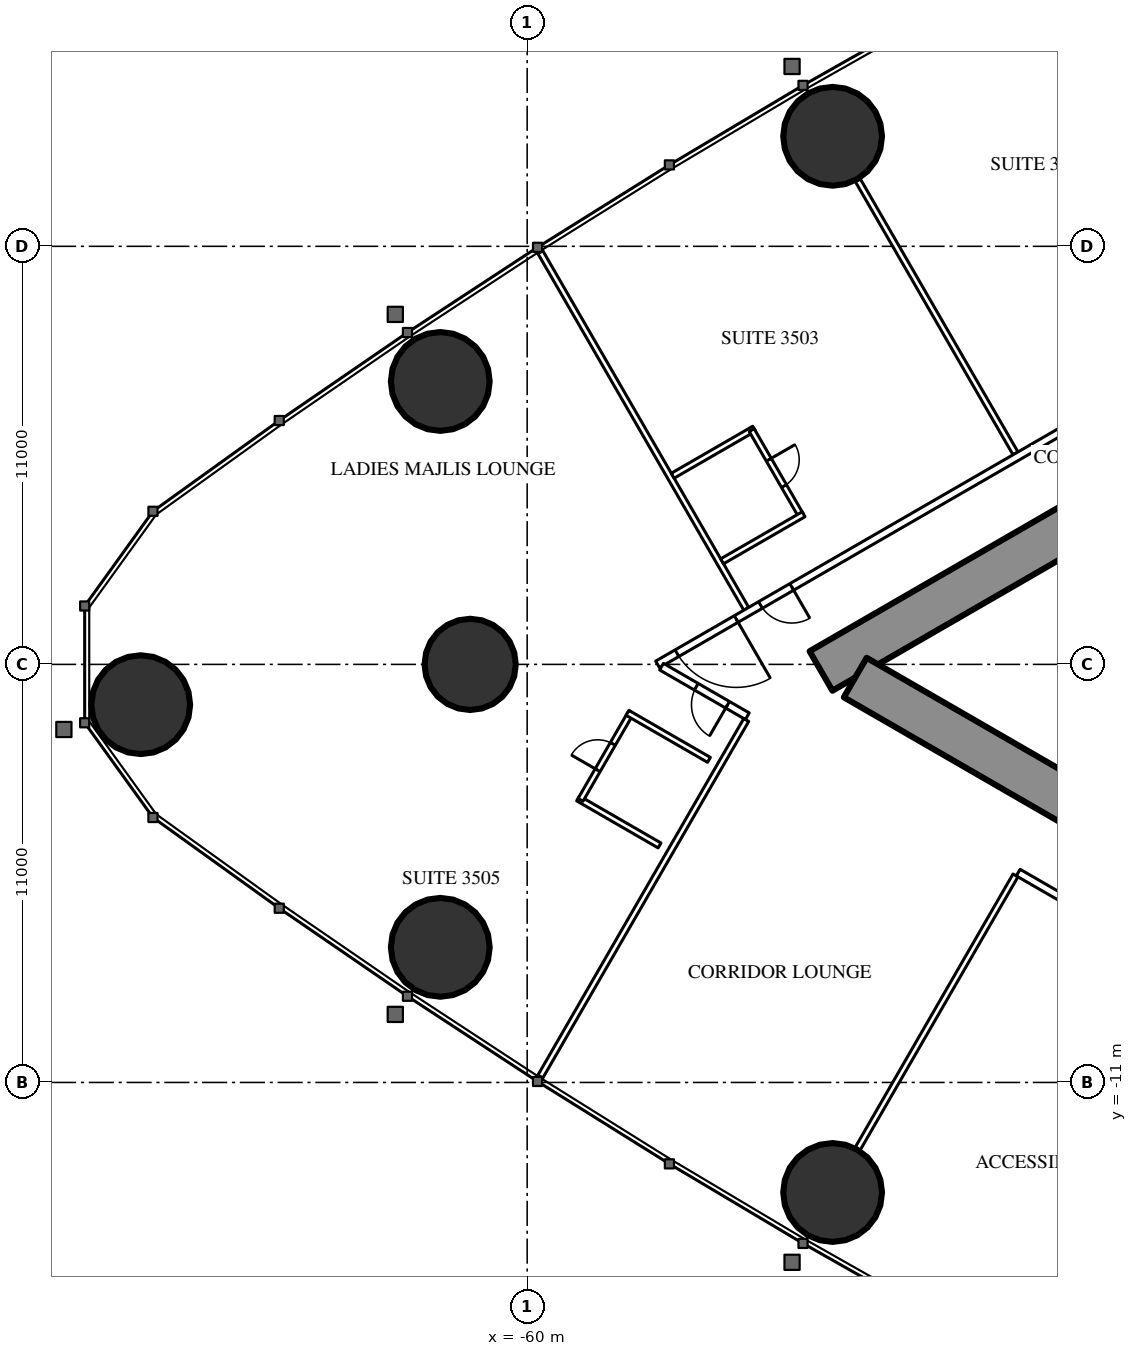
"""IFC4 building model, lengths in metres.
Left out: names, types, materials, properties, quantities, classifications, styles, units other than length and angle.
Written with IfcOpenShell. Run it as: python <this file> out.ifc"""

import sys

from ifc_helpers import new_model, si_unit, direction, frame, frame_2d, origin, origin_2d, place, context, subcontext, project, spatial, rectangle, circle, hollow_circle, extrude, element, fill, save


model = new_model("IFC4")
c1 = context("Model", 3, precision=1e-05, world=origin(), true_north=direction((0.0, 1.0)))
c2 = subcontext(c1, "Body", "Model", "MODEL_VIEW")
j1 = project(units=[si_unit("LENGTHUNIT", "METRE"), si_unit("PLANEANGLEUNIT", "RADIAN")], contexts=[c1])
p1 = place(None, origin())
s1 = spatial("IfcSite", under=j1, at=p1, CompositionType="ELEMENT")
p2 = place(p1, origin())
s2 = spatial("IfcBuilding", under=s1, at=p2, CompositionType="ELEMENT")
p3 = place(p2, frame((0.0, 0.0, 132.6)))
s3 = spatial("IfcBuildingStorey", under=s2, at=p3, CompositionType="ELEMENT", Elevation=132.6)
for number, where, z_axis, x_axis in (
    (1, (-70.168, -1.06, 0.0), (0.0, 0.0, 1.0), (1.0, 0.0, 0.0)),
    (2, (-62.287, -7.445, 0.0), (0.0, 0.0, 1.0), (1.0, 0.0, 0.0)),
    (3, (-51.963, -13.895, 0.0), (0.0, 0.0, 1.0), (1.0, 0.0, 0.0)),
    (4, (-51.963, 13.895, 0.0), (0.0, 0.0, 1.0), (1.0, 0.0, 0.0)),
    (5, (-62.287, 7.445, 0.0), (0.0, 0.0, 1.0), (1.0, 0.0, 0.0)),
):
    element("IfcColumn", number, at=place(p3, frame(where, z_axis=z_axis, x_axis=x_axis)), inside=s3, PredefinedType="COLUMN", context=c2, shape_type="SweptSolid", body=[
        extrude(hollow_circle(Radius=1.3, WallThickness=0.1, at=origin_2d()), origin(), (0.0, 0.0, 1.0), 3.5),
    ])
p4 = place(p3, frame((-61.5, 0.0, 0.0), z_axis=(0.0, 0.0, 1.0), x_axis=(1.0, 0.0, 0.0)))
e6 = element("IfcColumn", 6, at=p4, inside=s3, PredefinedType="COLUMN", context=c2, shape_type="SweptSolid", body=[
    extrude(circle(Radius=1.2, at=origin_2d()), origin(), (0.0, 0.0, 1.0), 3.5),
])
p5 = place(p3, frame((-27.2, 14.3, 0.0), z_axis=(0.0, 0.0, 1.0), x_axis=(-0.866026593062, -0.499997940104, 0.0)))
e7 = element("IfcWall", 7, at=p5, inside=s3, PredefinedType="SHEAR", context=c2, shape_type="SweptSolid", body=[
    extrude(rectangle(XDim=28.946, YDim=1.2, at=frame_2d((14.473, 0.0))), origin(), (0.0, 0.0, 1.0), 3.5),
])
p6 = place(p5, frame((4.6, 0.0, 0.0)))
e8 = element("IfcOpeningElement", 8, at=p6, cuts=e7, PredefinedType="OPENING", context=c2, shape_type="SweptSolid", body=[
    extrude(rectangle(XDim=1.0, YDim=2.2, at=frame_2d((0.5, 1.1))), frame((0.0, 0.61, 0.0), z_axis=(0.0, -1.0, 0.0), x_axis=(1.0, 0.0, 0.0)), (0.0, 0.0, 1.0), 1.22),
])
p7 = place(p5, frame((13.395, 0.0, 0.0)))
e9 = element("IfcOpeningElement", 9, at=p7, cuts=e7, PredefinedType="OPENING", context=c2, shape_type="SweptSolid", body=[
    extrude(rectangle(XDim=1.8, YDim=2.2, at=frame_2d((0.9, 1.1))), frame((0.0, 0.61, 0.0), z_axis=(0.0, -1.0, 0.0), x_axis=(1.0, 0.0, 0.0)), (0.0, 0.0, 1.0), 1.22),
])
p8 = place(p3, frame((-27.2, -14.3, 0.0), z_axis=(0.0, 0.0, 1.0), x_axis=(-0.866024021859, 0.500002393557, 0.0)))
e10 = element("IfcWall", 10, at=p8, inside=s3, PredefinedType="SHEAR", context=c2, shape_type="SweptSolid", body=[
    extrude(rectangle(XDim=27.907, YDim=1.2, at=frame_2d((13.954, 0.0))), origin(), (0.0, 0.0, 1.0), 3.5),
])
p9 = place(p8, frame((4.6, 0.0, 0.0)))
e11 = element("IfcOpeningElement", 11, at=p9, cuts=e10, PredefinedType="OPENING", context=c2, shape_type="SweptSolid", body=[
    extrude(rectangle(XDim=1.0, YDim=2.2, at=frame_2d((0.5, 1.1))), frame((0.0, 0.61, 0.0), z_axis=(0.0, -1.0, 0.0), x_axis=(1.0, 0.0, 0.0)), (0.0, 0.0, 1.0), 1.22),
])
p10 = place(p8, frame((13.395, 0.0, 0.0)))
e12 = element("IfcOpeningElement", 12, at=p10, cuts=e10, PredefinedType="OPENING", context=c2, shape_type="SweptSolid", body=[
    extrude(rectangle(XDim=1.8, YDim=2.2, at=frame_2d((0.9, 1.1))), frame((0.0, 0.61, 0.0), z_axis=(0.0, -1.0, 0.0), x_axis=(1.0, 0.0, 0.0)), (0.0, 0.0, 1.0), 1.22),
])
p11 = place(p3, frame((-47.151, 5.552, 0.0), z_axis=(0.0, 0.0, 1.0), x_axis=(-0.500003012045, 0.866023664773, 0.0)))
e13 = element("IfcWall", 13, at=p11, inside=s3, PredefinedType="PARTITIONING", context=c2, shape_type="SweptSolid", body=[
    extrude(rectangle(XDim=8.311, YDim=0.15, at=frame_2d((4.156, 0.0))), origin(), (0.0, 0.0, 1.0), 2.2),
])
p12 = place(p3, frame((-54.236, 1.462, 0.0), z_axis=(0.0, 0.0, 1.0), x_axis=(-0.499990351854, 0.866030974073, 0.0)))
e14 = element("IfcWall", 14, at=p12, inside=s3, PredefinedType="PARTITIONING", context=c2, shape_type="SweptSolid", body=[
    extrude(rectangle(XDim=10.834, YDim=0.15, at=frame_2d((5.417, 0.0))), origin(), (0.0, 0.0, 1.0), 3.25),
])
p13 = place(p3, frame((-47.151, -5.552, 0.0), z_axis=(0.0, 0.0, 1.0), x_axis=(-0.500003012045, -0.866023664773, 0.0)))
e15 = element("IfcWall", 15, at=p13, inside=s3, PredefinedType="PARTITIONING", context=c2, shape_type="SweptSolid", body=[
    extrude(rectangle(XDim=8.311, YDim=0.15, at=frame_2d((4.156, 0.0))), origin(), (0.0, 0.0, 1.0), 2.2),
])
p14 = place(p3, frame((-54.236, -1.462, 0.0), z_axis=(0.0, 0.0, 1.0), x_axis=(-0.499990351854, -0.866030974073, 0.0)))
e16 = element("IfcWall", 16, at=p14, inside=s3, PredefinedType="PARTITIONING", context=c2, shape_type="SweptSolid", body=[
    extrude(rectangle(XDim=10.834, YDim=0.15, at=frame_2d((5.417, 0.0))), origin(), (0.0, 0.0, 1.0), 3.25),
])
p15 = place(p3, frame((-37.7, 10.894, 0.0), z_axis=(0.0, 0.0, 1.0), x_axis=(-0.866027905338, -0.499995667157, 0.0)))
e17 = element("IfcWall", 17, at=p15, inside=s3, PredefinedType="PARTITIONING", context=c2, shape_type="SweptSolid", body=[
    extrude(rectangle(XDim=21.787, YDim=0.2, at=frame_2d((10.894, 0.0))), origin(), (0.0, 0.0, 1.0), 3.25),
])
p16 = place(p15, frame((17.711, 0.0, 0.0)))
e18 = element("IfcOpeningElement", 18, at=p16, cuts=e17, PredefinedType="OPENING", context=c2, shape_type="SweptSolid", body=[
    extrude(rectangle(XDim=0.95, YDim=2.2, at=frame_2d((0.475, 1.1))), frame((0.0, 0.11, 0.0), z_axis=(0.0, -1.0, 0.0), x_axis=(1.0, 0.0, 0.0)), (0.0, 0.0, 1.0), 0.22),
])
p17 = place(p15, frame((19.399, 0.0, 0.0)))
e19 = element("IfcOpeningElement", 19, at=p17, cuts=e17, PredefinedType="OPENING", context=c2, shape_type="SweptSolid", body=[
    extrude(rectangle(XDim=1.8, YDim=2.2, at=frame_2d((0.9, 1.1))), frame((0.0, 0.11, 0.0), z_axis=(0.0, -1.0, 0.0), x_axis=(1.0, 0.0, 0.0)), (0.0, 0.0, 1.0), 0.22),
])
p18 = place(p15, frame((0.6, 0.0, 0.0)))
e20 = element("IfcOpeningElement", 20, at=p18, cuts=e17, PredefinedType="OPENING", context=c2, shape_type="SweptSolid", body=[
    extrude(rectangle(XDim=0.95, YDim=2.2, at=frame_2d((0.475, 1.1))), frame((0.0, 0.11, 0.0), z_axis=(0.0, -1.0, 0.0), x_axis=(1.0, 0.0, 0.0)), (0.0, 0.0, 1.0), 0.22),
])
p19 = place(p3, frame((-36.92, -11.344, 0.0), z_axis=(0.0, 0.0, 1.0), x_axis=(-0.866027897759, 0.499995680284, 0.0)))
e21 = element("IfcWall", 21, at=p19, inside=s3, PredefinedType="PARTITIONING", context=c2, shape_type="SweptSolid", body=[
    extrude(rectangle(XDim=11.731, YDim=0.2, at=frame_2d((5.865, 0.0))), origin(), (0.0, 0.0, 1.0), 3.25),
])
p20 = place(p19, frame((3.35, 0.0, 0.0)))
e22 = element("IfcOpeningElement", 22, at=p20, cuts=e21, PredefinedType="OPENING", context=c2, shape_type="SweptSolid", body=[
    extrude(rectangle(XDim=1.0, YDim=2.2, at=frame_2d((0.5, 1.1))), frame((0.0, 0.11, 0.0), z_axis=(0.0, -1.0, 0.0), x_axis=(1.0, 0.0, 0.0)), (0.0, 0.0, 1.0), 0.22),
])
p21 = place(p3, frame((-54.207, -1.363, 0.0), z_axis=(0.0, 0.0, 1.0), x_axis=(-0.866049872286, 0.499957616916, 0.0)))
e23 = element("IfcWall", 23, at=p21, inside=s3, PredefinedType="PARTITIONING", context=c2, shape_type="SweptSolid", body=[
    extrude(rectangle(XDim=2.606, YDim=0.2, at=frame_2d((1.303, 0.0))), origin(), (0.0, 0.0, 1.0), 3.25),
])
p22 = place(p21, frame((0.6, 0.0, 0.0)))
e24 = element("IfcOpeningElement", 24, at=p22, cuts=e23, PredefinedType="OPENING", context=c2, shape_type="SweptSolid", body=[
    extrude(rectangle(XDim=0.95, YDim=2.2, at=frame_2d((0.475, 1.1))), frame((0.0, 0.11, 0.0), z_axis=(0.0, -1.0, 0.0), x_axis=(1.0, 0.0, 0.0)), (0.0, 0.0, 1.0), 0.22),
])
p23 = place(p3, frame((-54.027, 6.201, 0.0), z_axis=(0.0, 0.0, 1.0), x_axis=(-0.866006523861, -0.500032699561, 0.0)))
e25 = element("IfcWall", 25, at=p23, inside=s3, PredefinedType="PARTITIONING", context=c2, shape_type="SweptSolid", body=[
    extrude(rectangle(XDim=2.475, YDim=0.15, at=frame_2d((1.237, 0.0))), origin(), (0.0, 0.0, 1.0), 3.25),
])
p24 = place(p3, frame((-52.792, 3.912, 0.0), z_axis=(0.0, 0.0, 1.0), x_axis=(-0.500006934395, 0.866021400173, 0.0)))
e26 = element("IfcWall", 26, at=p24, inside=s3, PredefinedType="PARTITIONING", context=c2, shape_type="SweptSolid", body=[
    extrude(rectangle(XDim=2.6, YDim=0.15, at=frame_2d((1.3, 0.0))), origin(), (0.0, 0.0, 1.0), 3.25),
])
p25 = place(p24, frame((0.9, 0.0, 0.0)))
e27 = element("IfcOpeningElement", 27, at=p25, cuts=e26, PredefinedType="OPENING", context=c2, shape_type="SweptSolid", body=[
    extrude(rectangle(XDim=0.8, YDim=2.2, at=frame_2d((0.4, 1.1))), frame((0.0, 0.085, 0.0), z_axis=(0.0, -1.0, 0.0), x_axis=(1.0, 0.0, 0.0)), (0.0, 0.0, 1.0), 0.17),
])
p26 = place(p3, frame((-52.727, 3.95, 0.0), z_axis=(0.0, 0.0, 1.0), x_axis=(-0.866006523861, -0.500032699561, 0.0)))
e28 = element("IfcWall", 28, at=p26, inside=s3, PredefinedType="PARTITIONING", context=c2, shape_type="SweptSolid", body=[
    extrude(rectangle(XDim=2.475, YDim=0.15, at=frame_2d((1.237, 0.0))), origin(), (0.0, 0.0, 1.0), 3.25),
])
p27 = place(p3, frame((-56.517, -4.764, 0.0), z_axis=(0.0, 0.0, 1.0), x_axis=(-0.866031185235, 0.4999899861, 0.0)))
e29 = element("IfcWall", 29, at=p27, inside=s3, PredefinedType="PARTITIONING", context=c2, shape_type="SweptSolid", body=[
    extrude(rectangle(XDim=2.475, YDim=0.15, at=frame_2d((1.238, 0.0))), origin(), (0.0, 0.0, 1.0), 3.25),
])
p28 = place(p3, frame((-57.296, -1.312, 0.0), z_axis=(0.0, 0.0, 1.0), x_axis=(-0.49997716683, -0.86603858612, 0.0)))
e30 = element("IfcWall", 30, at=p28, inside=s3, PredefinedType="PARTITIONING", context=c2, shape_type="SweptSolid", body=[
    extrude(rectangle(XDim=2.6, YDim=0.15, at=frame_2d((1.3, 0.0))), origin(), (0.0, 0.0, 1.0), 3.25),
])
p29 = place(p28, frame((0.9, 0.0, 0.0)))
e31 = element("IfcOpeningElement", 31, at=p29, cuts=e30, PredefinedType="OPENING", context=c2, shape_type="SweptSolid", body=[
    extrude(rectangle(XDim=0.8, YDim=2.2, at=frame_2d((0.4, 1.1))), frame((0.0, 0.085, 0.0), z_axis=(0.0, -1.0, 0.0), x_axis=(1.0, 0.0, 0.0)), (0.0, 0.0, 1.0), 0.17),
])
p30 = place(p3, frame((-55.217, -2.512, 0.0), z_axis=(0.0, 0.0, 1.0), x_axis=(-0.866031185235, 0.4999899861, 0.0)))
e32 = element("IfcWall", 32, at=p30, inside=s3, PredefinedType="PARTITIONING", context=c2, shape_type="SweptSolid", body=[
    extrude(rectangle(XDim=2.475, YDim=0.15, at=frame_2d((1.238, 0.0))), origin(), (0.0, 0.0, 1.0), 3.25),
])
p31 = place(p25, origin())
e33 = element("IfcDoor", 33, at=p31, inside=s3, OperationType="SINGLE_SWING_RIGHT", PredefinedType="DOOR", context=c2, shape_type="SweptSolid", body=[
    extrude(rectangle(XDim=0.8, YDim=2.2, at=frame_2d((0.4, 1.1))), frame((0.0, 0.025, 0.0), z_axis=(0.0, -1.0, 0.0), x_axis=(1.0, 0.0, 0.0)), (0.0, 0.0, 1.0), 0.05),
])
fill(e27, e33)
p32 = place(p16, origin())
e34 = element("IfcDoor", 34, at=p32, inside=s3, OperationType="SINGLE_SWING_LEFT", PredefinedType="DOOR", context=c2, shape_type="SweptSolid", body=[
    extrude(rectangle(XDim=0.95, YDim=2.2, at=frame_2d((0.475, 1.1))), frame((0.0, 0.025, 0.0), z_axis=(0.0, -1.0, 0.0), x_axis=(1.0, 0.0, 0.0)), (0.0, 0.0, 1.0), 0.05),
])
fill(e18, e34)
p33 = place(p17, origin())
e35 = element("IfcDoor", 35, at=p33, inside=s3, OperationType="DOUBLE_DOOR_SINGLE_SWING", PredefinedType="DOOR", context=c2, shape_type="SweptSolid", body=[
    extrude(rectangle(XDim=1.8, YDim=2.2, at=frame_2d((0.9, 1.1))), frame((0.0, 0.025, 0.0), z_axis=(0.0, -1.0, 0.0), x_axis=(1.0, 0.0, 0.0)), (0.0, 0.0, 1.0), 0.05),
])
fill(e19, e35)
p34 = place(p29, origin())
e36 = element("IfcDoor", 36, at=p34, inside=s3, OperationType="SINGLE_SWING_RIGHT", PredefinedType="DOOR", context=c2, shape_type="SweptSolid", body=[
    extrude(rectangle(XDim=0.8, YDim=2.2, at=frame_2d((0.4, 1.1))), frame((0.0, 0.025, 0.0), z_axis=(0.0, -1.0, 0.0), x_axis=(1.0, 0.0, 0.0)), (0.0, 0.0, 1.0), 0.05),
])
fill(e31, e36)
p35 = place(p22, origin())
e37 = element("IfcDoor", 37, at=p35, inside=s3, OperationType="SINGLE_SWING_LEFT", PredefinedType="DOOR", context=c2, shape_type="SweptSolid", body=[
    extrude(rectangle(XDim=0.95, YDim=2.2, at=frame_2d((0.475, 1.1))), frame((0.0, 0.025, 0.0), z_axis=(0.0, -1.0, 0.0), x_axis=(1.0, 0.0, 0.0)), (0.0, 0.0, 1.0), 0.05),
])
fill(e24, e37)
save(model, sys.argv[1])
